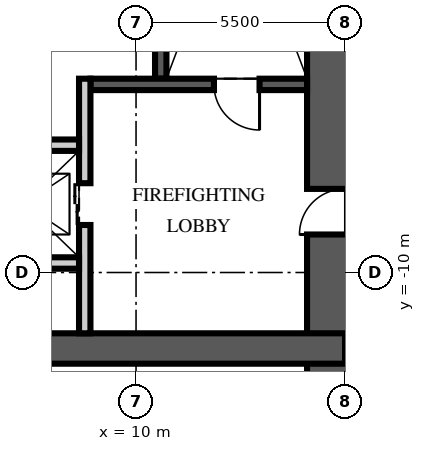
"""IFC4 building model, lengths in metres.
Left out: names, types, materials, properties, quantities, classifications, styles, units other than length and angle.
Written with IfcOpenShell. Run it as: python <this file> out.ifc"""

import sys

from ifc_helpers import new_model, si_unit, direction, frame, frame_2d, origin, place, context, subcontext, project, spatial, rectangle, extrude, element, fill, save


model = new_model("IFC4")
c1 = context("Model", 3, precision=1e-05, world=origin(), true_north=direction((0.0, 1.0)))
c2 = subcontext(c1, "Body", "Model", "MODEL_VIEW")
j1 = project(units=[si_unit("LENGTHUNIT", "METRE"), si_unit("PLANEANGLEUNIT", "RADIAN")], contexts=[c1])
p1 = place(None, origin())
s1 = spatial("IfcSite", under=j1, at=p1, CompositionType="ELEMENT")
p2 = place(p1, origin())
s2 = spatial("IfcBuilding", under=s1, at=p2, CompositionType="ELEMENT")
p3 = place(p2, frame((0.0, 0.0, 28.5)))
s3 = spatial("IfcBuildingStorey", under=s2, at=p3, CompositionType="ELEMENT", Elevation=28.5)
p4 = place(p3, frame((15.5, -15.5, -0.25), z_axis=(0.0, 0.0, 1.0), x_axis=(0.0, 1.0, 0.0)))
e1 = element("IfcWall", 1, at=p4, inside=s3, PredefinedType="SHEAR", context=c2, shape_type="SweptSolid", body=[
    extrude(rectangle(XDim=31.0, YDim=2.0, at=frame_2d((15.5, 0.0))), origin(), (0.0, 0.0, 1.0), 3.75),
])
p5 = place(p4, frame((6.5, 0.0, 0.25)))
e2 = element("IfcOpeningElement", 2, at=p5, cuts=e1, PredefinedType="OPENING", context=c2, shape_type="SweptSolid", body=[
    extrude(rectangle(XDim=1.2, YDim=2.1, at=frame_2d((0.6, 1.05))), frame((0.0, 1.01, 0.0), z_axis=(0.0, -1.0, 0.0), x_axis=(1.0, 0.0, 0.0)), (0.0, 0.0, 1.0), 2.02),
])
p6 = place(p4, frame((23.0, 0.0, 0.25)))
e3 = element("IfcOpeningElement", 3, at=p6, cuts=e1, PredefinedType="OPENING", context=c2, shape_type="SweptSolid", body=[
    extrude(rectangle(XDim=1.8, YDim=2.1, at=frame_2d((0.9, 1.05))), frame((0.0, 1.01, 0.0), z_axis=(0.0, -1.0, 0.0), x_axis=(1.0, 0.0, 0.0)), (0.0, 0.0, 1.0), 2.02),
])
p7 = place(p3, frame((-15.5, -12.0, -0.25), z_axis=(0.0, 0.0, 1.0), x_axis=(1.0, 0.0, 0.0)))
e4 = element("IfcWall", 4, at=p7, inside=s3, PredefinedType="SHEAR", context=c2, shape_type="SweptSolid", body=[
    extrude(rectangle(XDim=31.0, YDim=0.8, at=frame_2d((15.5, 0.0))), origin(), (0.0, 0.0, 1.0), 3.75),
])
p8 = place(p3, frame((10.65, -4.9, 0.0), z_axis=(0.0, 0.0, 1.0), x_axis=(0.0, 1.0, 0.0)))
e5 = element("IfcWall", 5, at=p8, inside=s3, PredefinedType="SOLIDWALL", context=c2, shape_type="SweptSolid", body=[
    extrude(rectangle(XDim=10.1, YDim=0.3, at=frame_2d((5.05, 0.0))), origin(), (0.0, 0.0, 1.0), 3.5),
])
p9 = place(p3, frame((14.5, -5.05, 0.0), z_axis=(0.0, 0.0, 1.0), x_axis=(-1.0, 0.0, 0.0)))
e6 = element("IfcWall", 6, at=p9, inside=s3, PredefinedType="SOLIDWALL", context=c2, shape_type="SweptSolid", body=[
    extrude(rectangle(XDim=5.7, YDim=0.3, at=frame_2d((2.85, 0.0))), origin(), (0.0, 0.0, 1.0), 3.5),
])
p10 = place(p9, frame((1.25, 0.0, 0.0)))
e7 = element("IfcOpeningElement", 7, at=p10, cuts=e6, PredefinedType="OPENING", context=c2, shape_type="SweptSolid", body=[
    extrude(rectangle(XDim=1.2, YDim=2.1, at=frame_2d((0.6, 1.05))), frame((0.0, 0.16, 0.0), z_axis=(0.0, -1.0, 0.0), x_axis=(1.0, 0.0, 0.0)), (0.0, 0.0, 1.0), 0.32),
])
p11 = place(p3, frame((8.65, -11.6, 0.0), z_axis=(0.0, 0.0, 1.0), x_axis=(0.0, 1.0, 0.0)))
e8 = element("IfcWall", 8, at=p11, inside=s3, PredefinedType="PARTITIONING", context=c2, shape_type="SweptSolid", body=[
    extrude(rectangle(XDim=6.7, YDim=0.3, at=frame_2d((3.35, 0.0))), origin(), (0.0, 0.0, 1.0), 3.5),
])
p12 = place(p11, frame((2.85, 0.0, 0.0)))
e9 = element("IfcOpeningElement", 9, at=p12, cuts=e8, PredefinedType="OPENING", context=c2, shape_type="SweptSolid", body=[
    extrude(rectangle(XDim=1.1, YDim=2.1, at=frame_2d((0.55, 1.05))), frame((0.0, 0.16, 0.0), z_axis=(0.0, -1.0, 0.0), x_axis=(1.0, 0.0, 0.0)), (0.0, 0.0, 1.0), 0.32),
])
p13 = place(p3, frame((-8.5, -6.65, 0.0), z_axis=(0.0, 0.0, 1.0), x_axis=(1.0, 0.0, 0.0)))
e10 = element("IfcWall", 10, at=p13, inside=s3, PredefinedType="PARTITIONING", context=c2, shape_type="SweptSolid", body=[
    extrude(rectangle(XDim=17.0, YDim=0.3, at=frame_2d((8.5, 0.0))), origin(), (0.0, 0.0, 1.0), 3.5),
])
p14 = place(p13, frame((7.8, 0.0, 0.0)))
e11 = element("IfcOpeningElement", 11, at=p14, cuts=e10, PredefinedType="OPENING", context=c2, shape_type="SweptSolid", body=[
    extrude(rectangle(XDim=1.3, YDim=2.4, at=frame_2d((0.65, 1.2))), frame((0.0, 0.16, 0.0), z_axis=(0.0, -1.0, 0.0), x_axis=(1.0, 0.0, 0.0)), (0.0, 0.0, 1.0), 0.32),
])
p15 = place(p13, frame((5.65, 0.0, 0.0)))
e12 = element("IfcOpeningElement", 12, at=p15, cuts=e10, PredefinedType="OPENING", context=c2, shape_type="SweptSolid", body=[
    extrude(rectangle(XDim=0.9, YDim=2.1, at=frame_2d((0.45, 1.05))), frame((0.0, 0.16, 0.0), z_axis=(0.0, -1.0, 0.0), x_axis=(1.0, 0.0, 0.0)), (0.0, 0.0, 1.0), 0.32),
])
p16 = place(p13, frame((10.4, 0.0, 0.0)))
e13 = element("IfcOpeningElement", 13, at=p16, cuts=e10, PredefinedType="OPENING", context=c2, shape_type="SweptSolid", body=[
    extrude(rectangle(XDim=0.9, YDim=2.1, at=frame_2d((0.45, 1.05))), frame((0.0, 0.16, 0.0), z_axis=(0.0, -1.0, 0.0), x_axis=(1.0, 0.0, 0.0)), (0.0, 0.0, 1.0), 0.32),
])
p17 = place(p3, frame((5.6, -9.75, 0.0), z_axis=(0.0, 0.0, 1.0), x_axis=(1.0, 0.0, 0.0)))
e14 = element("IfcWall", 14, at=p17, inside=s3, PredefinedType="PARTITIONING", context=c2, shape_type="SweptSolid", body=[
    extrude(rectangle(XDim=2.9, YDim=0.3, at=frame_2d((1.45, 0.0))), origin(), (0.0, 0.0, 1.0), 3.5),
])
p18 = place(p10, origin())
e15 = element("IfcDoor", 15, at=p18, inside=s3, OperationType="SINGLE_SWING_LEFT", PredefinedType="DOOR", context=c2, shape_type="SweptSolid", body=[
    extrude(rectangle(XDim=1.2, YDim=2.1, at=frame_2d((0.6, 1.05))), frame((0.0, 0.025, 0.0), z_axis=(0.0, -1.0, 0.0), x_axis=(1.0, 0.0, 0.0)), (0.0, 0.0, 1.0), 0.05),
])
fill(e7, e15)
p19 = place(p5, origin())
e16 = element("IfcDoor", 16, at=p19, inside=s3, OperationType="SINGLE_SWING_LEFT", PredefinedType="DOOR", context=c2, shape_type="SweptSolid", body=[
    extrude(rectangle(XDim=1.2, YDim=2.1, at=frame_2d((0.6, 1.05))), frame((0.0, 0.025, 0.0), z_axis=(0.0, -1.0, 0.0), x_axis=(1.0, 0.0, 0.0)), (0.0, 0.0, 1.0), 0.05),
])
fill(e2, e16)
p20 = place(p12, origin())
e17 = element("IfcDoor", 17, at=p20, inside=s3, OperationType="DOUBLE_DOOR_SLIDING", PredefinedType="DOOR", context=c2, shape_type="SweptSolid", body=[
    extrude(rectangle(XDim=1.1, YDim=2.1, at=frame_2d((0.55, 1.05))), frame((0.0, 0.025, 0.0), z_axis=(0.0, -1.0, 0.0), x_axis=(1.0, 0.0, 0.0)), (0.0, 0.0, 1.0), 0.05),
])
fill(e9, e17)
save(model, sys.argv[1])
